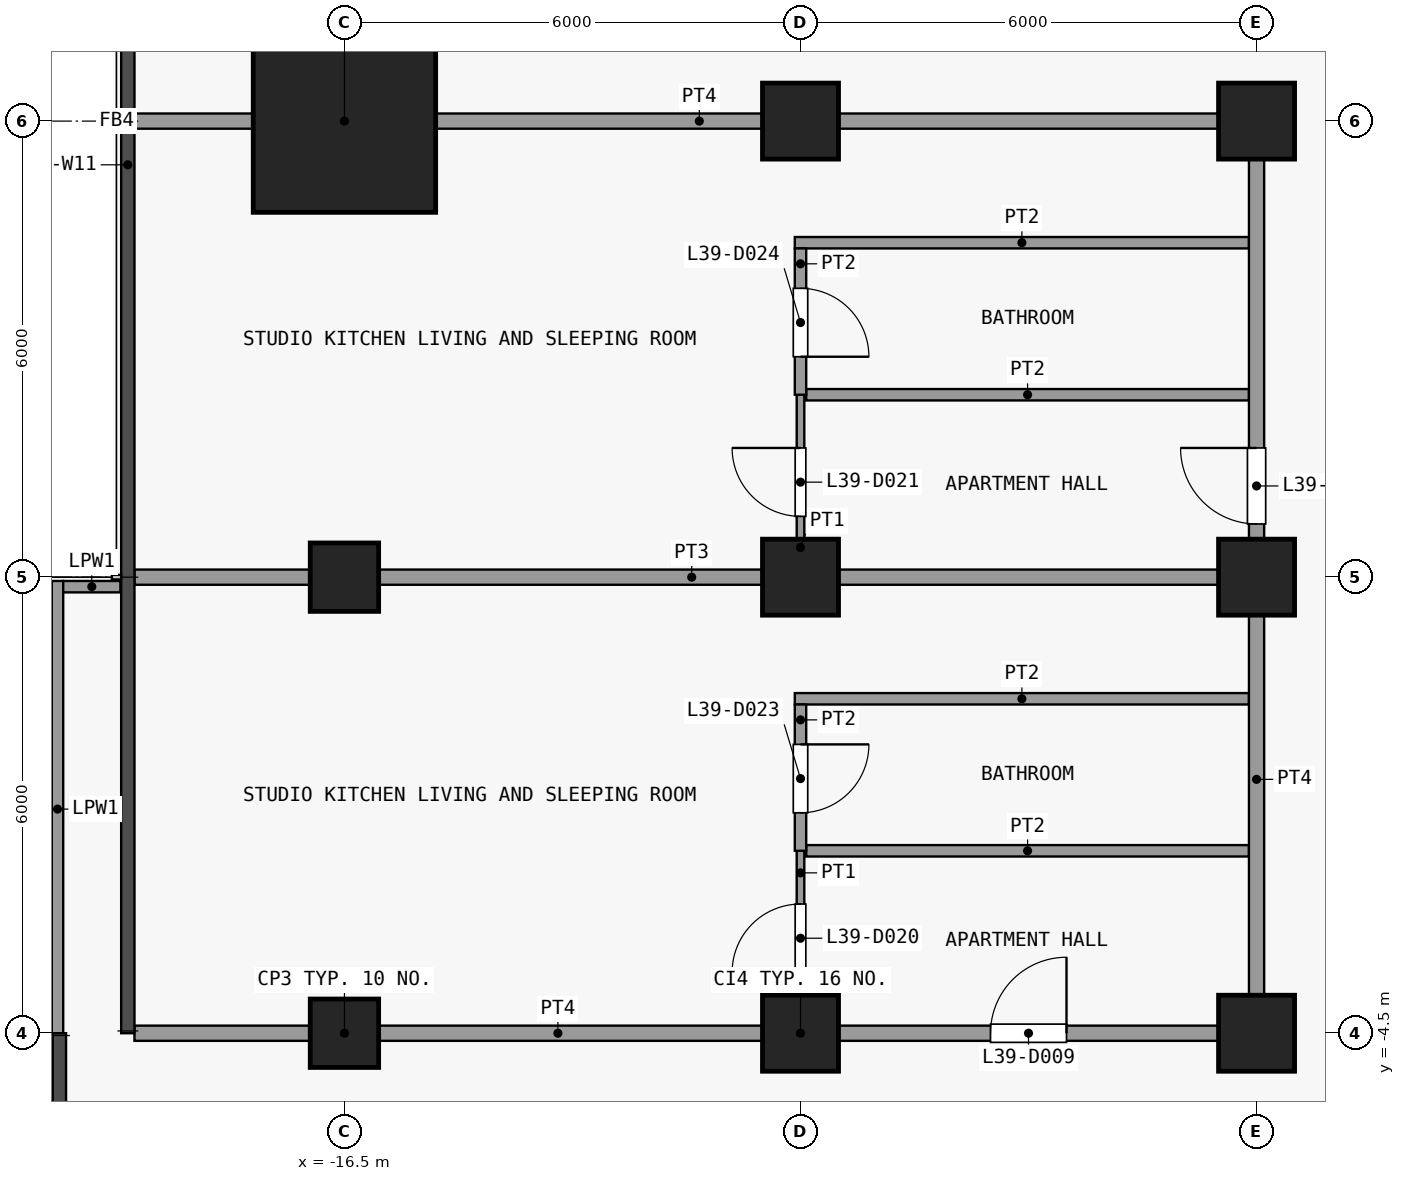
"""IFC4 building model, lengths in metres.
Left out: names, types, materials, properties, quantities, classifications, styles, units other than length and angle.
Written with IfcOpenShell. Run it as: python <this file> out.ifc"""

import sys

from ifc_helpers import new_model, si_unit, direction, frame, frame_2d, origin, origin_2d, place, context, subcontext, project, spatial, rectangle, extrude, element, fill, save


model = new_model("IFC4")
c1 = context("Model", 3, precision=1e-05, world=origin(), true_north=direction((0.0, 1.0)))
c2 = subcontext(c1, "Body", "Model", "MODEL_VIEW")
j1 = project(units=[si_unit("LENGTHUNIT", "METRE"), si_unit("PLANEANGLEUNIT", "RADIAN")], contexts=[c1])
p1 = place(None, origin())
s1 = spatial("IfcSite", under=j1, at=p1, CompositionType="ELEMENT")
p2 = place(p1, origin())
s2 = spatial("IfcBuilding", under=s1, at=p2, CompositionType="ELEMENT")
p3 = place(p2, frame((0.0, 0.0, 160.1)))
s3 = spatial("IfcBuildingStorey", under=s2, at=p3, CompositionType="ELEMENT", Elevation=160.1)
for number, where, z_axis, x_axis in (
    (1, (-16.5, -4.5, 0.0), (0.0, 0.0, 1.0), (1.0, 0.0, 0.0)),
    (2, (-16.5, 1.5, 0.0), (0.0, 0.0, 1.0), (1.0, 0.0, 0.0)),
):
    element("IfcColumn", number, at=place(p3, frame(where, z_axis=z_axis, x_axis=x_axis)), inside=s3, PredefinedType="COLUMN", context=c2, shape_type="SweptSolid", body=[
        extrude(rectangle(XDim=0.9, YDim=0.9, at=origin_2d()), origin(), (0.0, 0.0, 1.0), 3.6),
    ])
p4 = place(p3, frame((-16.5, 7.5, 0.0), z_axis=(0.0, 0.0, 1.0), x_axis=(1.0, 0.0, 0.0)))
e3 = element("IfcColumn", 3, at=p4, inside=s3, PredefinedType="COLUMN", context=c2, shape_type="SweptSolid", body=[
    extrude(rectangle(XDim=2.4, YDim=2.4, at=origin_2d()), origin(), (0.0, 0.0, 1.0), 3.6),
])
for number, where, z_axis, x_axis in (
    (4, (-10.5, -4.5, 0.0), (0.0, 0.0, 1.0), (1.0, 0.0, 0.0)),
    (5, (-10.5, 1.5, 0.0), (0.0, 0.0, 1.0), (1.0, 0.0, 0.0)),
    (6, (-10.5, 7.5, 0.0), (0.0, 0.0, 1.0), (1.0, 0.0, 0.0)),
    (7, (-4.5, -4.5, 0.0), (0.0, 0.0, 1.0), (1.0, 0.0, 0.0)),
    (8, (-4.5, 1.5, 0.0), (0.0, 0.0, 1.0), (1.0, 0.0, 0.0)),
    (9, (-4.5, 7.5, 0.0), (0.0, 0.0, 1.0), (1.0, 0.0, 0.0)),
):
    element("IfcColumn", number, at=place(p3, frame(where, z_axis=z_axis, x_axis=x_axis)), inside=s3, PredefinedType="COLUMN", context=c2, shape_type="SweptSolid", body=[
        extrude(rectangle(XDim=1.0, YDim=1.0, at=origin_2d()), origin(), (0.0, 0.0, 1.0), 3.6),
    ])
p5 = place(p3, frame((-20.275, -4.552, 0.0), z_axis=(0.0, 0.0, 1.0), x_axis=(0.0, 1.0, 0.0)))
e10 = element("IfcWall", 10, at=p5, inside=s3, PredefinedType="PARAPET", context=c2, shape_type="SweptSolid", body=[
    extrude(rectangle(XDim=6.002, YDim=0.15, at=frame_2d((3.001, 0.0))), origin(), (0.0, 0.0, 1.0), 1.15),
])
p6 = place(p3, frame((-20.2, 1.375, 0.0), z_axis=(0.0, 0.0, 1.0), x_axis=(1.0, 0.0, 0.0)))
e11 = element("IfcWall", 11, at=p6, inside=s3, PredefinedType="PARAPET", context=c2, shape_type="SweptSolid", body=[
    extrude(rectangle(XDim=0.752, YDim=0.15, at=frame_2d((0.376, 0.0))), origin(), (0.0, 0.0, 1.0), 1.15),
])
p7 = place(p3, frame((-19.262, -4.5, 0.0), z_axis=(0.0, 0.0, 1.0), x_axis=(1.0, 0.0, 0.0)))
e12 = element("IfcWall", 12, at=p7, inside=s3, PredefinedType="PARTITIONING", context=c2, shape_type="SweptSolid", body=[
    extrude(rectangle(XDim=14.863, YDim=0.2, at=frame_2d((7.431, 0.0))), origin(), (0.0, 0.0, 1.0), 3.3),
])
p8 = place(p7, frame((11.262, 0.0, 0.0)))
e13 = element("IfcOpeningElement", 13, at=p8, cuts=e12, PredefinedType="OPENING", context=c2, shape_type="SweptSolid", body=[
    extrude(rectangle(XDim=1.0, YDim=2.1, at=frame_2d((0.5, 1.05))), frame((0.0, 0.11, 0.0), z_axis=(0.0, -1.0, 0.0), x_axis=(1.0, 0.0, 0.0)), (0.0, 0.0, 1.0), 0.22),
])
p9 = place(p3, frame((-10.425, -2.1, 0.0), z_axis=(0.0, 0.0, 1.0), x_axis=(1.0, 0.0, 0.0)))
e14 = element("IfcWall", 14, at=p9, inside=s3, PredefinedType="PARTITIONING", context=c2, shape_type="SweptSolid", body=[
    extrude(rectangle(XDim=5.825, YDim=0.15, at=frame_2d((2.913, 0.0))), origin(), (0.0, 0.0, 1.0), 3.3),
])
p10 = place(p3, frame((-10.575, -0.1, 0.0), z_axis=(0.0, 0.0, 1.0), x_axis=(1.0, 0.0, 0.0)))
e15 = element("IfcWall", 15, at=p10, inside=s3, PredefinedType="PARTITIONING", context=c2, shape_type="SweptSolid", body=[
    extrude(rectangle(XDim=5.975, YDim=0.15, at=frame_2d((2.987, 0.0))), origin(), (0.0, 0.0, 1.0), 3.3),
])
p11 = place(p3, frame((-19.262, 1.5, 0.0), z_axis=(0.0, 0.0, 1.0), x_axis=(1.0, 0.0, 0.0)))
e16 = element("IfcWall", 16, at=p11, inside=s3, PredefinedType="PARTITIONING", context=c2, shape_type="SweptSolid", body=[
    extrude(rectangle(XDim=14.662, YDim=0.2, at=frame_2d((7.331, 0.0))), origin(), (0.0, 0.0, 1.0), 3.3),
])
p12 = place(p3, frame((-10.425, 3.9, 0.0), z_axis=(0.0, 0.0, 1.0), x_axis=(1.0, 0.0, 0.0)))
e17 = element("IfcWall", 17, at=p12, inside=s3, PredefinedType="PARTITIONING", context=c2, shape_type="SweptSolid", body=[
    extrude(rectangle(XDim=5.825, YDim=0.15, at=frame_2d((2.913, 0.0))), origin(), (0.0, 0.0, 1.0), 3.3),
])
p13 = place(p3, frame((-10.575, 5.9, 0.0), z_axis=(0.0, 0.0, 1.0), x_axis=(1.0, 0.0, 0.0)))
e18 = element("IfcWall", 18, at=p13, inside=s3, PredefinedType="PARTITIONING", context=c2, shape_type="SweptSolid", body=[
    extrude(rectangle(XDim=5.975, YDim=0.15, at=frame_2d((2.987, 0.0))), origin(), (0.0, 0.0, 1.0), 3.3),
])
p14 = place(p3, frame((-19.262, 7.5, 0.0), z_axis=(0.0, 0.0, 1.0), x_axis=(1.0, 0.0, 0.0)))
e19 = element("IfcWall", 19, at=p14, inside=s3, PredefinedType="PARTITIONING", context=c2, shape_type="SweptSolid", body=[
    extrude(rectangle(XDim=14.863, YDim=0.2, at=frame_2d((7.431, 0.0))), origin(), (0.0, 0.0, 1.0), 3.3),
])
p15 = place(p3, frame((-10.5, -4.4, 0.0), z_axis=(0.0, 0.0, 1.0), x_axis=(0.0, 1.0, 0.0)))
e20 = element("IfcWall", 20, at=p15, inside=s3, PredefinedType="PARTITIONING", context=c2, shape_type="SweptSolid", body=[
    extrude(rectangle(XDim=2.3, YDim=0.1, at=frame_2d((1.15, 0.0))), origin(), (0.0, 0.0, 1.0), 3.3),
])
p16 = place(p15, frame((0.7, 0.0, 0.0)))
e21 = element("IfcOpeningElement", 21, at=p16, cuts=e20, PredefinedType="OPENING", context=c2, shape_type="SweptSolid", body=[
    extrude(rectangle(XDim=0.9, YDim=2.1, at=frame_2d((0.45, 1.05))), frame((0.0, 0.06, 0.0), z_axis=(0.0, -1.0, 0.0), x_axis=(1.0, 0.0, 0.0)), (0.0, 0.0, 1.0), 0.12),
])
p17 = place(p3, frame((-10.5, 1.6, 0.0), z_axis=(0.0, 0.0, 1.0), x_axis=(0.0, 1.0, 0.0)))
e22 = element("IfcWall", 22, at=p17, inside=s3, PredefinedType="PARTITIONING", context=c2, shape_type="SweptSolid", body=[
    extrude(rectangle(XDim=2.3, YDim=0.1, at=frame_2d((1.15, 0.0))), origin(), (0.0, 0.0, 1.0), 3.3),
])
p18 = place(p17, frame((0.7, 0.0, 0.0)))
e23 = element("IfcOpeningElement", 23, at=p18, cuts=e22, PredefinedType="OPENING", context=c2, shape_type="SweptSolid", body=[
    extrude(rectangle(XDim=0.9, YDim=2.1, at=frame_2d((0.45, 1.05))), frame((0.0, 0.06, 0.0), z_axis=(0.0, -1.0, 0.0), x_axis=(1.0, 0.0, 0.0)), (0.0, 0.0, 1.0), 0.12),
])
p19 = place(p3, frame((-10.5, -2.1, 0.0), z_axis=(0.0, 0.0, 1.0), x_axis=(0.0, 1.0, 0.0)))
e24 = element("IfcWall", 24, at=p19, inside=s3, PredefinedType="PARTITIONING", context=c2, shape_type="SweptSolid", body=[
    extrude(rectangle(XDim=1.925, YDim=0.15, at=frame_2d((0.962, 0.0))), origin(), (0.0, 0.0, 1.0), 3.3),
])
p20 = place(p19, frame((0.5, 0.0, 0.0)))
e25 = element("IfcOpeningElement", 25, at=p20, cuts=e24, PredefinedType="OPENING", context=c2, shape_type="SweptSolid", body=[
    extrude(rectangle(XDim=0.9, YDim=2.1, at=frame_2d((0.45, 1.05))), frame((0.0, 0.085, 0.0), z_axis=(0.0, -1.0, 0.0), x_axis=(1.0, 0.0, 0.0)), (0.0, 0.0, 1.0), 0.17),
])
p21 = place(p3, frame((-10.5, 3.9, 0.0), z_axis=(0.0, 0.0, 1.0), x_axis=(0.0, 1.0, 0.0)))
e26 = element("IfcWall", 26, at=p21, inside=s3, PredefinedType="PARTITIONING", context=c2, shape_type="SweptSolid", body=[
    extrude(rectangle(XDim=1.925, YDim=0.15, at=frame_2d((0.962, 0.0))), origin(), (0.0, 0.0, 1.0), 3.3),
])
p22 = place(p21, frame((0.5, 0.0, 0.0)))
e27 = element("IfcOpeningElement", 27, at=p22, cuts=e26, PredefinedType="OPENING", context=c2, shape_type="SweptSolid", body=[
    extrude(rectangle(XDim=0.9, YDim=2.1, at=frame_2d((0.45, 1.05))), frame((0.0, 0.085, 0.0), z_axis=(0.0, -1.0, 0.0), x_axis=(1.0, 0.0, 0.0)), (0.0, 0.0, 1.0), 0.17),
])
p23 = place(p3, frame((-4.5, -4.4, 0.0), z_axis=(0.0, 0.0, 1.0), x_axis=(0.0, 1.0, 0.0)))
e28 = element("IfcWall", 28, at=p23, inside=s3, PredefinedType="PARTITIONING", context=c2, shape_type="SweptSolid", body=[
    extrude(rectangle(XDim=11.8, YDim=0.2, at=frame_2d((5.9, 0.0))), origin(), (0.0, 0.0, 1.0), 3.3),
])
p24 = place(p23, frame((6.6, 0.0, 0.0)))
e29 = element("IfcOpeningElement", 29, at=p24, cuts=e28, PredefinedType="OPENING", context=c2, shape_type="SweptSolid", body=[
    extrude(rectangle(XDim=1.0, YDim=2.1, at=frame_2d((0.5, 1.05))), frame((0.0, 0.11, 0.0), z_axis=(0.0, -1.0, 0.0), x_axis=(1.0, 0.0, 0.0)), (0.0, 0.0, 1.0), 0.22),
])
p25 = place(p8, origin())
e30 = element("IfcDoor", 30, at=p25, inside=s3, OperationType="SINGLE_SWING_LEFT", PredefinedType="DOOR", context=c2, shape_type="SweptSolid", body=[
    extrude(rectangle(XDim=1.0, YDim=2.1, at=frame_2d((0.5, 1.05))), frame((0.0, 0.025, 0.0), z_axis=(0.0, -1.0, 0.0), x_axis=(1.0, 0.0, 0.0)), (0.0, 0.0, 1.0), 0.05),
])
fill(e13, e30)
p26 = place(p16, origin())
e31 = element("IfcDoor", 31, at=p26, inside=s3, OperationType="SINGLE_SWING_RIGHT", PredefinedType="DOOR", context=c2, shape_type="SweptSolid", body=[
    extrude(rectangle(XDim=0.9, YDim=2.1, at=frame_2d((0.45, 1.05))), frame((0.0, 0.025, 0.0), z_axis=(0.0, -1.0, 0.0), x_axis=(1.0, 0.0, 0.0)), (0.0, 0.0, 1.0), 0.05),
])
fill(e21, e31)
p27 = place(p18, origin())
e32 = element("IfcDoor", 32, at=p27, inside=s3, OperationType="SINGLE_SWING_LEFT", PredefinedType="DOOR", context=c2, shape_type="SweptSolid", body=[
    extrude(rectangle(XDim=0.9, YDim=2.1, at=frame_2d((0.45, 1.05))), frame((0.0, 0.025, 0.0), z_axis=(0.0, -1.0, 0.0), x_axis=(1.0, 0.0, 0.0)), (0.0, 0.0, 1.0), 0.05),
])
fill(e23, e32)
p28 = place(p20, origin())
e33 = element("IfcDoor", 33, at=p28, inside=s3, OperationType="SINGLE_SWING_RIGHT", PredefinedType="DOOR", context=c2, shape_type="SweptSolid", body=[
    extrude(rectangle(XDim=0.9, YDim=2.1, at=frame_2d((0.45, 1.05))), frame((0.0, 0.025, 0.0), z_axis=(0.0, -1.0, 0.0), x_axis=(1.0, 0.0, 0.0)), (0.0, 0.0, 1.0), 0.05),
])
fill(e25, e33)
p29 = place(p22, origin())
e34 = element("IfcDoor", 34, at=p29, inside=s3, OperationType="SINGLE_SWING_LEFT", PredefinedType="DOOR", context=c2, shape_type="SweptSolid", body=[
    extrude(rectangle(XDim=0.9, YDim=2.1, at=frame_2d((0.45, 1.05))), frame((0.0, 0.025, 0.0), z_axis=(0.0, -1.0, 0.0), x_axis=(1.0, 0.0, 0.0)), (0.0, 0.0, 1.0), 0.05),
])
fill(e27, e34)
p30 = place(p24, origin())
e35 = element("IfcDoor", 35, at=p30, inside=s3, OperationType="SINGLE_SWING_LEFT", PredefinedType="DOOR", context=c2, shape_type="SweptSolid", body=[
    extrude(rectangle(XDim=1.0, YDim=2.1, at=frame_2d((0.5, 1.05))), frame((0.0, 0.025, 0.0), z_axis=(0.0, -1.0, 0.0), x_axis=(1.0, 0.0, 0.0)), (0.0, 0.0, 1.0), 0.05),
])
fill(e29, e35)
save(model, sys.argv[1])
